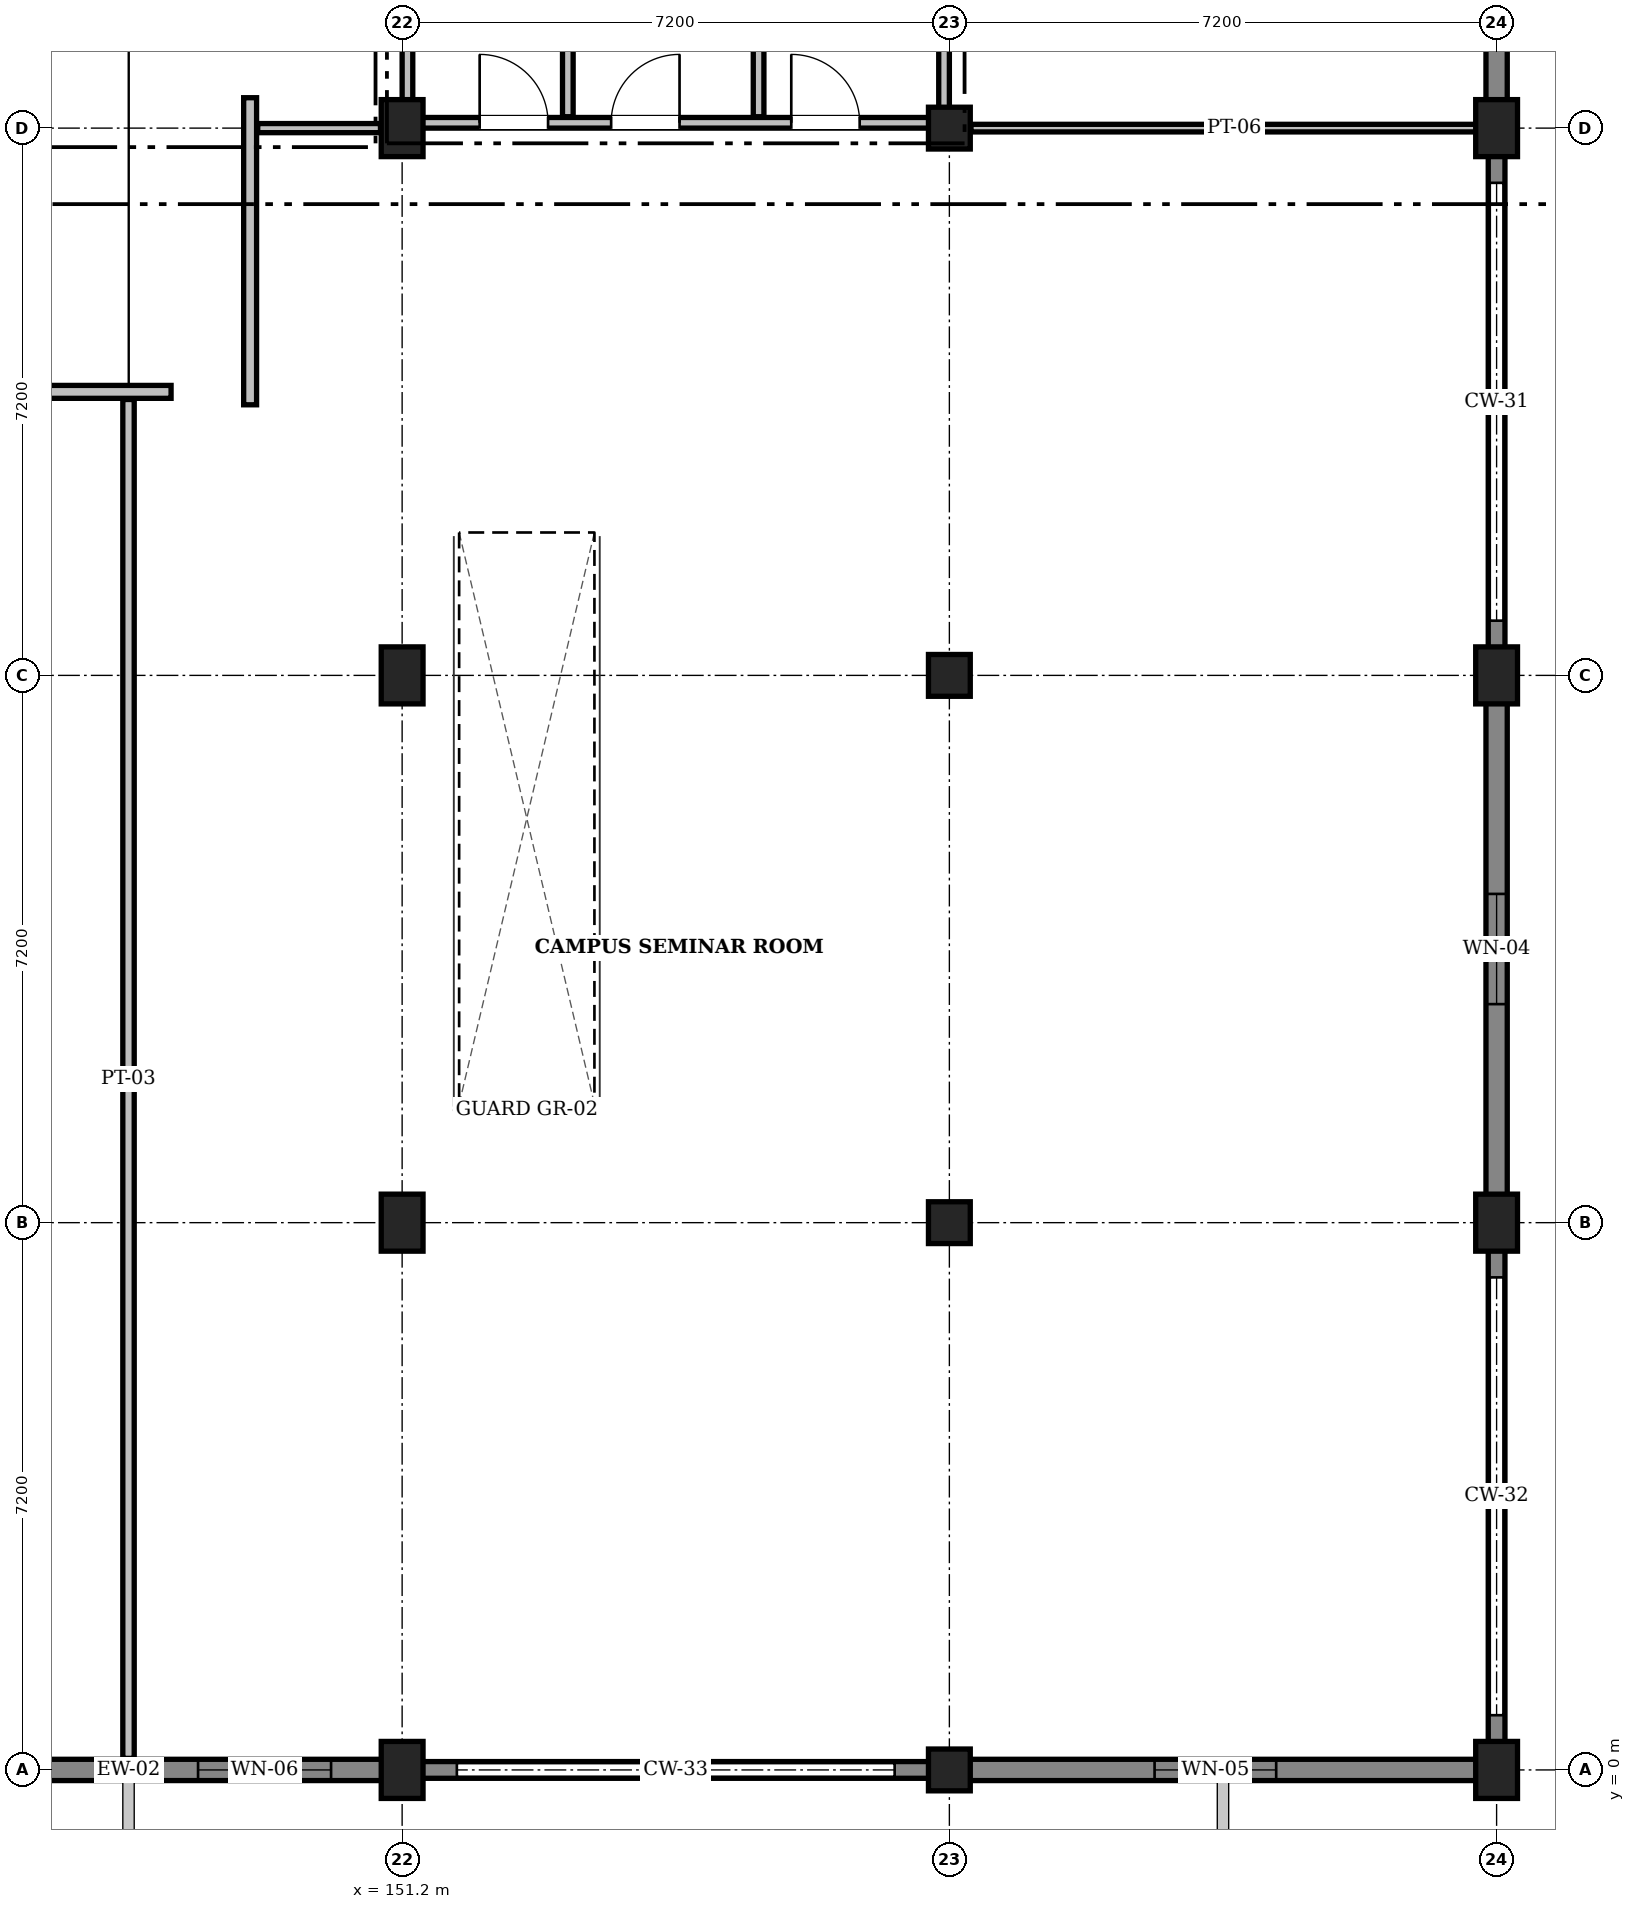
"""IFC4 building model, lengths in metres.
Left out: names, types, materials, properties, quantities, classifications, styles, units other than length and angle.
Written with IfcOpenShell. Run it as: python <this file> out.ifc"""

import sys

from ifc_helpers import new_model, si_unit, direction, frame, frame_2d, origin, origin_2d, place, context, subcontext, project, spatial, rectangle, extrude, element, fill, save


model = new_model("IFC4")
c1 = context("Model", 3, precision=1e-05, world=origin(), true_north=direction((0.0, 1.0)))
c2 = subcontext(c1, "Body", "Model", "MODEL_VIEW")
j1 = project(units=[si_unit("LENGTHUNIT", "METRE"), si_unit("PLANEANGLEUNIT", "RADIAN")], contexts=[c1])
p1 = place(None, origin())
s1 = spatial("IfcSite", under=j1, at=p1, CompositionType="ELEMENT")
p2 = place(p1, origin())
s2 = spatial("IfcBuilding", under=s1, at=p2, CompositionType="ELEMENT")
p3 = place(p2, frame((0.0, 0.0, 9.6)))
s3 = spatial("IfcBuildingStorey", under=s2, at=p3, CompositionType="ELEMENT", Elevation=9.6)
for number, where, z_axis, x_axis in (
    (1, (151.2, 0.0, 0.0), (0.0, 0.0, 1.0), (1.0, 0.0, 0.0)),
    (2, (151.2, 7.2, 0.0), (0.0, 0.0, 1.0), (1.0, 0.0, 0.0)),
    (3, (151.2, 14.4, 0.0), (0.0, 0.0, 1.0), (1.0, 0.0, 0.0)),
    (4, (151.2, 21.6, 0.0), (0.0, 0.0, 1.0), (1.0, 0.0, 0.0)),
):
    element("IfcColumn", number, at=place(p3, frame(where, z_axis=z_axis, x_axis=x_axis)), inside=s3, PredefinedType="COLUMN", context=c2, shape_type="SweptSolid", body=[
        extrude(rectangle(XDim=0.55, YDim=0.75, at=origin_2d()), origin(), (0.0, 0.0, 1.0), 4.8),
    ])
for number, where, z_axis, x_axis in (
    (5, (158.4, 0.0, 0.0), (0.0, 0.0, 1.0), (1.0, 0.0, 0.0)),
    (6, (158.4, 7.2, 0.0), (0.0, 0.0, 1.0), (1.0, 0.0, 0.0)),
    (7, (158.4, 14.4, 0.0), (0.0, 0.0, 1.0), (1.0, 0.0, 0.0)),
    (8, (158.4, 21.6, 0.0), (0.0, 0.0, 1.0), (1.0, 0.0, 0.0)),
):
    element("IfcColumn", number, at=place(p3, frame(where, z_axis=z_axis, x_axis=x_axis)), inside=s3, PredefinedType="COLUMN", context=c2, shape_type="SweptSolid", body=[
        extrude(rectangle(XDim=0.55, YDim=0.55, at=origin_2d()), origin(), (0.0, 0.0, 1.0), 4.8),
    ])
for number, where, z_axis, x_axis in (
    (9, (165.6, 0.0, 0.0), (0.0, 0.0, 1.0), (1.0, 0.0, 0.0)),
    (10, (165.6, 7.2, 0.0), (0.0, 0.0, 1.0), (1.0, 0.0, 0.0)),
    (11, (165.6, 14.4, 0.0), (0.0, 0.0, 1.0), (1.0, 0.0, 0.0)),
    (12, (165.6, 21.6, 0.0), (0.0, 0.0, 1.0), (1.0, 0.0, 0.0)),
):
    element("IfcColumn", number, at=place(p3, frame(where, z_axis=z_axis, x_axis=x_axis)), inside=s3, PredefinedType="COLUMN", context=c2, shape_type="SweptSolid", body=[
        extrude(rectangle(XDim=0.55, YDim=0.75, at=origin_2d()), origin(), (0.0, 0.0, 1.0), 4.8),
    ])
p4 = place(p3, frame((165.6, 28.8, 0.0), z_axis=(0.0, 0.0, 1.0), x_axis=(0.0, -1.0, 0.0)))
e13 = element("IfcWall", 13, at=p4, inside=s3, PredefinedType="SOLIDWALL", context=c2, shape_type="SweptSolid", body=[
    extrude(rectangle(XDim=7.2, YDim=0.28, at=frame_2d((3.6, 0.0))), origin(), (0.0, 0.0, 1.0), 4.52),
])
p5 = place(p4, frame((2.95, 0.0, 0.95)))
e14 = element("IfcOpeningElement", 14, at=p5, cuts=e13, PredefinedType="OPENING", context=c2, shape_type="SweptSolid", body=[
    extrude(rectangle(XDim=1.3, YDim=1.3, at=frame_2d((0.65, 0.65))), frame((0.0, 0.152, 0.0), z_axis=(0.0, -1.0, 0.0), x_axis=(1.0, 0.0, 0.0)), (0.0, 0.0, 1.0), 0.304),
])
p6 = place(p3, frame((165.6, 21.6, 0.0), z_axis=(0.0, 0.0, 1.0), x_axis=(0.0, -1.0, 0.0)))
e15 = element("IfcWall", 15, at=p6, inside=s3, PredefinedType="SOLIDWALL", context=c2, shape_type="SweptSolid", body=[
    extrude(rectangle(XDim=7.2, YDim=0.22, at=frame_2d((3.6, 0.0))), origin(), (0.0, 0.0, 1.0), 1.24),
])
p7 = place(p3, frame((165.6, 14.4, 0.0), z_axis=(0.0, 0.0, 1.0), x_axis=(0.0, -1.0, 0.0)))
e16 = element("IfcWall", 16, at=p7, inside=s3, PredefinedType="SOLIDWALL", context=c2, shape_type="SweptSolid", body=[
    extrude(rectangle(XDim=7.2, YDim=0.28, at=frame_2d((3.6, 0.0))), origin(), (0.0, 0.0, 1.0), 4.52),
])
p8 = place(p7, frame((2.875, 0.0, 0.95)))
e17 = element("IfcOpeningElement", 17, at=p8, cuts=e16, PredefinedType="OPENING", context=c2, shape_type="SweptSolid", body=[
    extrude(rectangle(XDim=1.45, YDim=1.3, at=frame_2d((0.725, 0.65))), frame((0.0, 0.152, 0.0), z_axis=(0.0, -1.0, 0.0), x_axis=(1.0, 0.0, 0.0)), (0.0, 0.0, 1.0), 0.304),
])
p9 = place(p3, frame((165.6, 7.2, 0.0), z_axis=(0.0, 0.0, 1.0), x_axis=(0.0, -1.0, 0.0)))
e18 = element("IfcWall", 18, at=p9, inside=s3, PredefinedType="SOLIDWALL", context=c2, shape_type="SweptSolid", body=[
    extrude(rectangle(XDim=7.048, YDim=0.22, at=frame_2d((3.524, 0.0))), origin(), (0.0, 0.0, 1.0), 1.24),
])
p10 = place(p3, frame((165.75, 0.0, 0.0), z_axis=(0.0, 0.0, 1.0), x_axis=(-1.0, 0.0, 0.0)))
e19 = element("IfcWall", 19, at=p10, inside=s3, PredefinedType="SOLIDWALL", context=c2, shape_type="SweptSolid", body=[
    extrude(rectangle(XDim=7.35, YDim=0.28, at=frame_2d((3.675, 0.0))), origin(), (0.0, 0.0, 1.0), 4.52),
])
p11 = place(p10, frame((3.05, 0.0, 0.95)))
e20 = element("IfcOpeningElement", 20, at=p11, cuts=e19, PredefinedType="OPENING", context=c2, shape_type="SweptSolid", body=[
    extrude(rectangle(XDim=1.6, YDim=1.3, at=frame_2d((0.8, 0.65))), frame((0.0, 0.152, 0.0), z_axis=(0.0, -1.0, 0.0), x_axis=(1.0, 0.0, 0.0)), (0.0, 0.0, 1.0), 0.304),
])
p12 = place(p3, frame((158.4, 0.0, 0.0), z_axis=(0.0, 0.0, 1.0), x_axis=(-1.0, 0.0, 0.0)))
e21 = element("IfcWall", 21, at=p12, inside=s3, PredefinedType="SOLIDWALL", context=c2, shape_type="SweptSolid", body=[
    extrude(rectangle(XDim=7.2, YDim=0.22, at=frame_2d((3.6, 0.0))), origin(), (0.0, 0.0, 1.0), 1.24),
])
p13 = place(p3, frame((151.2, 0.0, 0.0), z_axis=(0.0, 0.0, 1.0), x_axis=(-1.0, 0.0, 0.0)))
e22 = element("IfcWall", 22, at=p13, inside=s3, PredefinedType="SOLIDWALL", context=c2, shape_type="SweptSolid", body=[
    extrude(rectangle(XDim=7.2, YDim=0.28, at=frame_2d((3.6, 0.0))), origin(), (0.0, 0.0, 1.0), 4.52),
])
p14 = place(p13, frame((0.935, 0.0, 0.95)))
e23 = element("IfcOpeningElement", 23, at=p14, cuts=e22, PredefinedType="OPENING", context=c2, shape_type="SweptSolid", body=[
    extrude(rectangle(XDim=1.75, YDim=1.3, at=frame_2d((0.875, 0.65))), frame((0.0, 0.152, 0.0), z_axis=(0.0, -1.0, 0.0), x_axis=(1.0, 0.0, 0.0)), (0.0, 0.0, 1.0), 0.304),
])
p15 = place(p3, frame((151.27, 21.67, 0.0), z_axis=(0.0, 0.0, 1.0), x_axis=(1.0, 0.0, 0.0)))
e24 = element("IfcWall", 24, at=p15, inside=s3, PredefinedType="PARTITIONING", context=c2, shape_type="SweptSolid", body=[
    extrude(rectangle(XDim=7.06, YDim=0.14, at=frame_2d((3.53, 0.0))), origin(), (0.0, 0.0, 1.0), 4.46),
])
p16 = place(p15, frame((0.95, 0.0, 0.0)))
e25 = element("IfcOpeningElement", 25, at=p16, cuts=e24, PredefinedType="OPENING", context=c2, shape_type="SweptSolid", body=[
    extrude(rectangle(XDim=0.9, YDim=2.08, at=frame_2d((0.45, 1.04))), frame((0.0, 0.082, 0.0), z_axis=(0.0, -1.0, 0.0), x_axis=(1.0, 0.0, 0.0)), (0.0, 0.0, 1.0), 0.164),
])
p17 = place(p15, frame((2.68, 0.0, 0.0)))
e26 = element("IfcOpeningElement", 26, at=p17, cuts=e24, PredefinedType="OPENING", context=c2, shape_type="SweptSolid", body=[
    extrude(rectangle(XDim=0.9, YDim=2.08, at=frame_2d((0.45, 1.04))), frame((0.0, 0.082, 0.0), z_axis=(0.0, -1.0, 0.0), x_axis=(1.0, 0.0, 0.0)), (0.0, 0.0, 1.0), 0.164),
])
p18 = place(p15, frame((5.05, 0.0, 0.0)))
e27 = element("IfcOpeningElement", 27, at=p18, cuts=e24, PredefinedType="OPENING", context=c2, shape_type="SweptSolid", body=[
    extrude(rectangle(XDim=0.9, YDim=2.08, at=frame_2d((0.45, 1.04))), frame((0.0, 0.082, 0.0), z_axis=(0.0, -1.0, 0.0), x_axis=(1.0, 0.0, 0.0)), (0.0, 0.0, 1.0), 0.164),
])
for number, where, z_axis, x_axis in (
    (28, (151.27, 21.75, 0.0), (0.0, 0.0, 1.0), (0.0, 1.0, 0.0)),
    (29, (158.33, 21.75, 0.0), (0.0, 0.0, 1.0), (0.0, 1.0, 0.0)),
    (30, (153.38, 21.75, 0.0), (0.0, 0.0, 1.0), (0.0, 1.0, 0.0)),
    (31, (155.89, 21.75, 0.0), (0.0, 0.0, 1.0), (0.0, 1.0, 0.0)),
):
    element("IfcWall", number, at=place(p3, frame(where, z_axis=z_axis, x_axis=x_axis)), inside=s3, PredefinedType="PARTITIONING", context=c2, shape_type="SweptSolid", body=[
        extrude(rectangle(XDim=6.9, YDim=0.14, at=frame_2d((3.45, 0.0))), origin(), (0.0, 0.0, 1.0), 4.46),
    ])
p19 = place(p3, frame((129.04, 18.13, 0.0), z_axis=(0.0, 0.0, 1.0), x_axis=(1.0, 0.0, 0.0)))
e32 = element("IfcWall", 32, at=p19, inside=s3, PredefinedType="PARTITIONING", context=c2, shape_type="SweptSolid", body=[
    extrude(rectangle(XDim=19.12, YDim=0.17, at=frame_2d((9.56, 0.0))), origin(), (0.0, 0.0, 1.0), 4.46),
])
p20 = place(p19, frame((9.02, 0.0, 0.0)))
e33 = element("IfcOpeningElement", 33, at=p20, cuts=e32, PredefinedType="OPENING", context=c2, shape_type="SweptSolid", body=[
    extrude(rectangle(XDim=1.08, YDim=2.2, at=frame_2d((0.54, 1.1))), frame((0.0, 0.097, 0.0), z_axis=(0.0, -1.0, 0.0), x_axis=(1.0, 0.0, 0.0)), (0.0, 0.0, 1.0), 0.194),
])
p21 = place(p19, frame((7.67, 0.0, 0.0)))
e34 = element("IfcOpeningElement", 34, at=p21, cuts=e32, PredefinedType="OPENING", context=c2, shape_type="SweptSolid", body=[
    extrude(rectangle(XDim=0.98, YDim=2.14, at=frame_2d((0.49, 1.07))), frame((0.0, 0.097, 0.0), z_axis=(0.0, -1.0, 0.0), x_axis=(1.0, 0.0, 0.0)), (0.0, 0.0, 1.0), 0.194),
])
p22 = place(p19, frame((10.64, 0.0, 0.0)))
e35 = element("IfcOpeningElement", 35, at=p22, cuts=e32, PredefinedType="OPENING", context=c2, shape_type="SweptSolid", body=[
    extrude(rectangle(XDim=1.04, YDim=2.18, at=frame_2d((0.52, 1.09))), frame((0.0, 0.097, 0.0), z_axis=(0.0, -1.0, 0.0), x_axis=(1.0, 0.0, 0.0)), (0.0, 0.0, 1.0), 0.194),
])
p23 = place(p19, frame((6.22, 0.0, 0.0)))
e36 = element("IfcOpeningElement", 36, at=p23, cuts=e32, PredefinedType="OPENING", context=c2, shape_type="SweptSolid", body=[
    extrude(rectangle(XDim=1.08, YDim=2.2, at=frame_2d((0.54, 1.1))), frame((0.0, 0.097, 0.0), z_axis=(0.0, -1.0, 0.0), x_axis=(1.0, 0.0, 0.0)), (0.0, 0.0, 1.0), 0.194),
])
p24 = place(p19, frame((12.19, 0.0, 0.0)))
e37 = element("IfcOpeningElement", 37, at=p24, cuts=e32, PredefinedType="OPENING", context=c2, shape_type="SweptSolid", body=[
    extrude(rectangle(XDim=1.14, YDim=2.2, at=frame_2d((0.57, 1.1))), frame((0.0, 0.097, 0.0), z_axis=(0.0, -1.0, 0.0), x_axis=(1.0, 0.0, 0.0)), (0.0, 0.0, 1.0), 0.194),
])
p25 = place(p19, frame((4.55, 0.0, 0.0)))
e38 = element("IfcOpeningElement", 38, at=p25, cuts=e32, PredefinedType="OPENING", context=c2, shape_type="SweptSolid", body=[
    extrude(rectangle(XDim=1.22, YDim=2.22, at=frame_2d((0.61, 1.11))), frame((0.0, 0.097, 0.0), z_axis=(0.0, -1.0, 0.0), x_axis=(1.0, 0.0, 0.0)), (0.0, 0.0, 1.0), 0.194),
])
p26 = place(p19, frame((13.72, 0.0, 0.0)))
e39 = element("IfcOpeningElement", 39, at=p26, cuts=e32, PredefinedType="OPENING", context=c2, shape_type="SweptSolid", body=[
    extrude(rectangle(XDim=1.28, YDim=2.22, at=frame_2d((0.64, 1.11))), frame((0.0, 0.097, 0.0), z_axis=(0.0, -1.0, 0.0), x_axis=(1.0, 0.0, 0.0)), (0.0, 0.0, 1.0), 0.194),
])
p27 = place(p19, frame((2.69, 0.0, 0.0)))
e40 = element("IfcOpeningElement", 40, at=p27, cuts=e32, PredefinedType="OPENING", context=c2, shape_type="SweptSolid", body=[
    extrude(rectangle(XDim=1.34, YDim=2.24, at=frame_2d((0.67, 1.12))), frame((0.0, 0.097, 0.0), z_axis=(0.0, -1.0, 0.0), x_axis=(1.0, 0.0, 0.0)), (0.0, 0.0, 1.0), 0.194),
])
p28 = place(p19, frame((15.45, 0.0, 0.0)))
e41 = element("IfcOpeningElement", 41, at=p28, cuts=e32, PredefinedType="OPENING", context=c2, shape_type="SweptSolid", body=[
    extrude(rectangle(XDim=1.42, YDim=2.24, at=frame_2d((0.71, 1.12))), frame((0.0, 0.097, 0.0), z_axis=(0.0, -1.0, 0.0), x_axis=(1.0, 0.0, 0.0)), (0.0, 0.0, 1.0), 0.194),
])
p29 = place(p3, frame((149.2, 17.96, 0.0), z_axis=(0.0, 0.0, 1.0), x_axis=(0.0, 1.0, 0.0)))
e42 = element("IfcWall", 42, at=p29, inside=s3, PredefinedType="PARTITIONING", context=c2, shape_type="SweptSolid", body=[
    extrude(rectangle(XDim=4.04, YDim=0.17, at=frame_2d((2.02, 0.0))), origin(), (0.0, 0.0, 1.0), 4.46),
])
p30 = place(p3, frame((147.6, 0.152, 0.0), z_axis=(0.0, 0.0, 1.0), x_axis=(0.0, 1.0, 0.0)))
e43 = element("IfcWall", 43, at=p30, inside=s3, PredefinedType="PARTITIONING", context=c2, shape_type="SweptSolid", body=[
    extrude(rectangle(XDim=17.878, YDim=0.15, at=frame_2d((8.939, 0.0))), origin(), (0.0, 0.0, 1.0), 4.46),
])
p31 = place(p3, frame((149.3, 21.6, 0.0), z_axis=(0.0, 0.0, 1.0), x_axis=(1.0, 0.0, 0.0)))
e44 = element("IfcWall", 44, at=p31, inside=s3, PredefinedType="PARTITIONING", context=c2, shape_type="SweptSolid", body=[
    extrude(rectangle(XDim=1.615, YDim=0.12, at=frame_2d((0.808, 0.0))), origin(), (0.0, 0.0, 1.0), 4.46),
])
p32 = place(p3, frame((158.685, 21.6, 0.0), z_axis=(0.0, 0.0, 1.0), x_axis=(1.0, 0.0, 0.0)))
e45 = element("IfcWall", 45, at=p32, inside=s3, PredefinedType="PARTITIONING", context=c2, shape_type="SweptSolid", body=[
    extrude(rectangle(XDim=6.763, YDim=0.1, at=frame_2d((3.381, 0.0))), origin(), (0.0, 0.0, 1.0), 4.46),
])
p33 = place(p8, origin())
e46 = element("IfcWindow", 46, at=p33, inside=s3, PartitioningType="SINGLE_PANEL", PredefinedType="WINDOW", context=c2, shape_type="SweptSolid", body=[
    extrude(rectangle(XDim=1.45, YDim=1.3, at=frame_2d((0.725, 0.65))), frame((0.0, 0.03, 0.0), z_axis=(0.0, -1.0, 0.0), x_axis=(1.0, 0.0, 0.0)), (0.0, 0.0, 1.0), 0.06),
])
fill(e17, e46)
p34 = place(p11, origin())
e47 = element("IfcWindow", 47, at=p34, inside=s3, PartitioningType="SINGLE_PANEL", PredefinedType="WINDOW", context=c2, shape_type="SweptSolid", body=[
    extrude(rectangle(XDim=1.6, YDim=1.3, at=frame_2d((0.8, 0.65))), frame((0.0, 0.03, 0.0), z_axis=(0.0, -1.0, 0.0), x_axis=(1.0, 0.0, 0.0)), (0.0, 0.0, 1.0), 0.06),
])
fill(e20, e47)
p35 = place(p14, origin())
e48 = element("IfcWindow", 48, at=p35, inside=s3, PartitioningType="SINGLE_PANEL", PredefinedType="WINDOW", context=c2, shape_type="SweptSolid", body=[
    extrude(rectangle(XDim=1.75, YDim=1.3, at=frame_2d((0.875, 0.65))), frame((0.0, 0.03, 0.0), z_axis=(0.0, -1.0, 0.0), x_axis=(1.0, 0.0, 0.0)), (0.0, 0.0, 1.0), 0.06),
])
fill(e23, e48)
p36 = place(p16, origin())
e49 = element("IfcDoor", 49, at=p36, inside=s3, OperationType="SINGLE_SWING_LEFT", PredefinedType="DOOR", context=c2, shape_type="SweptSolid", body=[
    extrude(rectangle(XDim=0.9, YDim=2.08, at=frame_2d((0.45, 1.04))), frame((0.0, 0.025, 0.0), z_axis=(0.0, -1.0, 0.0), x_axis=(1.0, 0.0, 0.0)), (0.0, 0.0, 1.0), 0.05),
])
fill(e25, e49)
p37 = place(p17, origin())
e50 = element("IfcDoor", 50, at=p37, inside=s3, OperationType="SINGLE_SWING_RIGHT", PredefinedType="DOOR", context=c2, shape_type="SweptSolid", body=[
    extrude(rectangle(XDim=0.9, YDim=2.08, at=frame_2d((0.45, 1.04))), frame((0.0, 0.025, 0.0), z_axis=(0.0, -1.0, 0.0), x_axis=(1.0, 0.0, 0.0)), (0.0, 0.0, 1.0), 0.05),
])
fill(e26, e50)
p38 = place(p18, origin())
e51 = element("IfcDoor", 51, at=p38, inside=s3, OperationType="SINGLE_SWING_LEFT", PredefinedType="DOOR", context=c2, shape_type="SweptSolid", body=[
    extrude(rectangle(XDim=0.9, YDim=2.08, at=frame_2d((0.45, 1.04))), frame((0.0, 0.025, 0.0), z_axis=(0.0, -1.0, 0.0), x_axis=(1.0, 0.0, 0.0)), (0.0, 0.0, 1.0), 0.05),
])
fill(e27, e51)
save(model, sys.argv[1])
